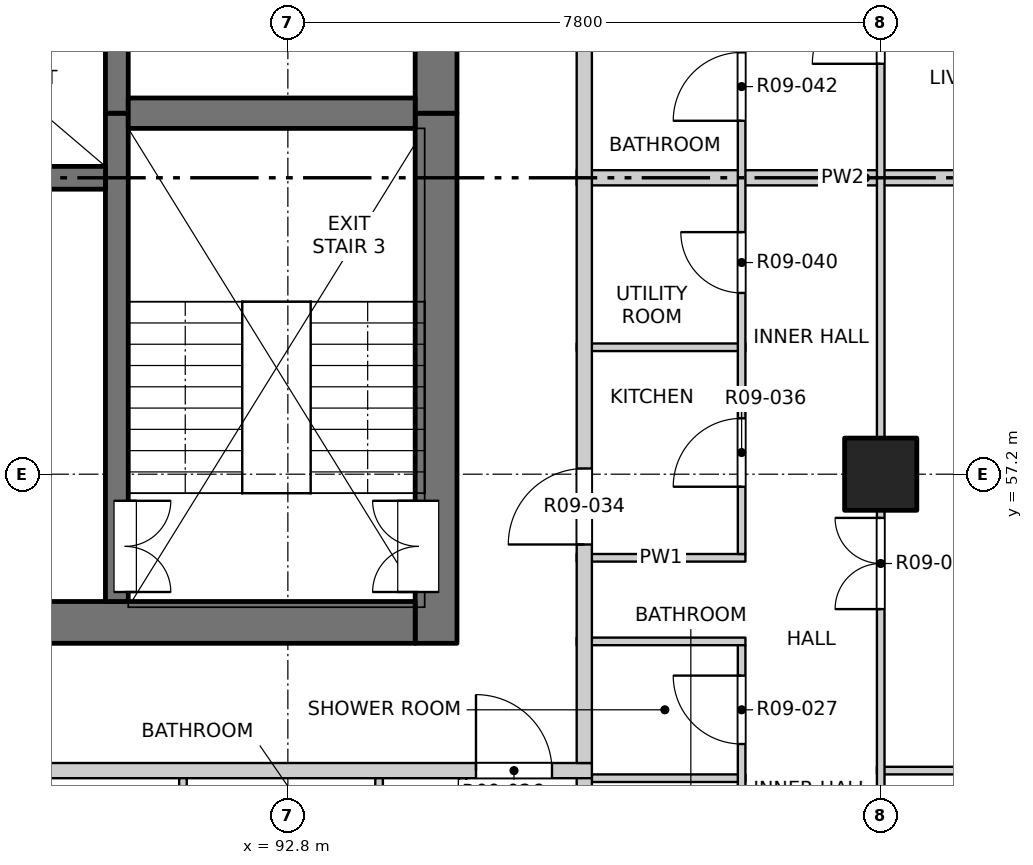
"""IFC4 building model, lengths in metres.
Left out: names, types, materials, properties, quantities, classifications, styles, units other than length and angle.
Written with IfcOpenShell. Run it as: python <this file> out.ifc"""

import sys

from ifc_helpers import new_model, si_unit, direction, frame, frame_2d, origin, origin_2d, place, context, subcontext, project, spatial, rectangle, extrude, element, fill, save


model = new_model("IFC4")
c1 = context("Model", 3, precision=1e-05, world=origin(), true_north=direction((0.0, 1.0)))
c2 = subcontext(c1, "Body", "Model", "MODEL_VIEW")
j1 = project(units=[si_unit("LENGTHUNIT", "METRE"), si_unit("PLANEANGLEUNIT", "RADIAN")], contexts=[c1])
p1 = place(None, origin())
s1 = spatial("IfcSite", under=j1, at=p1, CompositionType="ELEMENT")
p2 = place(p1, origin())
s2 = spatial("IfcBuilding", under=s1, at=p2, CompositionType="ELEMENT")
p3 = place(p2, frame((0.0, 0.0, 113.5)))
s3 = spatial("IfcBuildingStorey", under=s2, at=p3, CompositionType="ELEMENT", Elevation=113.5)
p4 = place(p3, frame((100.6, 57.2, -0.25), z_axis=(0.0, 0.0, 1.0), x_axis=(1.0, 0.0, 0.0)))
e1 = element("IfcColumn", 1, at=p4, inside=s3, PredefinedType="COLUMN", context=c2, shape_type="SweptSolid", body=[
    extrude(rectangle(XDim=0.95, YDim=0.95, at=origin_2d()), origin(), (0.0, 0.0, 1.0), 3.35),
])
p5 = place(p3, frame((94.75, 54.975, -0.25), z_axis=(0.0, 0.0, 1.0), x_axis=(0.0, 1.0, 0.0)))
e2 = element("IfcWall", 2, at=p5, inside=s3, PredefinedType="SOLIDWALL", context=c2, shape_type="SweptSolid", body=[
    extrude(rectangle(XDim=6.975, YDim=0.55, at=frame_2d((3.487, 0.0))), origin(), (0.0, 0.0, 1.0), 3.35),
])
p6 = place(p5, frame((0.675, 0.0, 0.25)))
e3 = element("IfcOpeningElement", 3, at=p6, cuts=e2, PredefinedType="OPENING", context=c2, shape_type="SweptSolid", body=[
    extrude(rectangle(XDim=1.2, YDim=2.1, at=frame_2d((0.6, 1.05))), frame((0.0, 0.285, 0.0), z_axis=(0.0, -1.0, 0.0), x_axis=(1.0, 0.0, 0.0)), (0.0, 0.0, 1.0), 0.57),
])
p7 = place(p3, frame((94.75, 61.95, -0.25), z_axis=(0.0, 0.0, 1.0), x_axis=(0.0, 1.0, 0.0)))
e4 = element("IfcWall", 4, at=p7, inside=s3, PredefinedType="SOLIDWALL", context=c2, shape_type="SweptSolid", body=[
    extrude(rectangle(XDim=15.35, YDim=0.55, at=frame_2d((7.675, 0.0))), origin(), (0.0, 0.0, 1.0), 3.35),
])
p8 = place(p7, frame((0.925, 0.0, 0.25)))
e5 = element("IfcOpeningElement", 5, at=p8, cuts=e4, PredefinedType="OPENING", context=c2, shape_type="SweptSolid", body=[
    extrude(rectangle(XDim=0.9, YDim=2.1, at=frame_2d((0.45, 1.05))), frame((0.0, 0.285, 0.0), z_axis=(0.0, -1.0, 0.0), x_axis=(1.0, 0.0, 0.0)), (0.0, 0.0, 1.0), 0.57),
])
p9 = place(p7, frame((3.8, 0.0, 0.25)))
e6 = element("IfcOpeningElement", 6, at=p9, cuts=e4, PredefinedType="OPENING", context=c2, shape_type="SweptSolid", body=[
    extrude(rectangle(XDim=0.9, YDim=2.1, at=frame_2d((0.45, 1.05))), frame((0.0, 0.285, 0.0), z_axis=(0.0, -1.0, 0.0), x_axis=(1.0, 0.0, 0.0)), (0.0, 0.0, 1.0), 0.57),
])
p10 = place(p7, frame((8.3, 0.0, 0.25)))
e7 = element("IfcOpeningElement", 7, at=p10, cuts=e4, PredefinedType="OPENING", context=c2, shape_type="SweptSolid", body=[
    extrude(rectangle(XDim=0.9, YDim=2.1, at=frame_2d((0.45, 1.05))), frame((0.0, 0.285, 0.0), z_axis=(0.0, -1.0, 0.0), x_axis=(1.0, 0.0, 0.0)), (0.0, 0.0, 1.0), 0.57),
])
p11 = place(p7, frame((13.1, 0.0, 0.25)))
e8 = element("IfcOpeningElement", 8, at=p11, cuts=e4, PredefinedType="OPENING", context=c2, shape_type="SweptSolid", body=[
    extrude(rectangle(XDim=0.9, YDim=2.1, at=frame_2d((0.45, 1.05))), frame((0.0, 0.285, 0.0), z_axis=(0.0, -1.0, 0.0), x_axis=(1.0, 0.0, 0.0)), (0.0, 0.0, 1.0), 0.57),
])
p12 = place(p3, frame((75.525, 55.25, -0.25), z_axis=(0.0, 0.0, 1.0), x_axis=(1.0, 0.0, 0.0)))
e9 = element("IfcWall", 9, at=p12, inside=s3, PredefinedType="SOLIDWALL", context=c2, shape_type="SweptSolid", body=[
    extrude(rectangle(XDim=18.95, YDim=0.55, at=frame_2d((9.475, 0.0))), origin(), (0.0, 0.0, 1.0), 3.35),
])
p13 = place(p12, frame((8.725, 0.0, 0.25)))
e10 = element("IfcOpeningElement", 10, at=p13, cuts=e9, PredefinedType="OPENING", context=c2, shape_type="SweptSolid", body=[
    extrude(rectangle(XDim=1.5, YDim=2.1, at=frame_2d((0.75, 1.05))), frame((0.0, 0.285, 0.0), z_axis=(0.0, -1.0, 0.0), x_axis=(1.0, 0.0, 0.0)), (0.0, 0.0, 1.0), 0.57),
])
p14 = place(p3, frame((90.55, 55.525, -0.25), z_axis=(0.0, 0.0, 1.0), x_axis=(0.0, 1.0, 0.0)))
e11 = element("IfcWall", 11, at=p14, inside=s3, PredefinedType="SOLIDWALL", context=c2, shape_type="SweptSolid", body=[
    extrude(rectangle(XDim=6.425, YDim=0.3, at=frame_2d((3.212, 0.0))), origin(), (0.0, 0.0, 1.0), 3.35),
])
p15 = place(p14, frame((0.125, 0.0, 0.25)))
e12 = element("IfcOpeningElement", 12, at=p15, cuts=e11, PredefinedType="OPENING", context=c2, shape_type="SweptSolid", body=[
    extrude(rectangle(XDim=1.2, YDim=2.1, at=frame_2d((0.6, 1.05))), frame((0.0, 0.16, 0.0), z_axis=(0.0, -1.0, 0.0), x_axis=(1.0, 0.0, 0.0)), (0.0, 0.0, 1.0), 0.32),
])
p16 = place(p3, frame((90.55, 61.95, -0.25), z_axis=(0.0, 0.0, 1.0), x_axis=(0.0, 1.0, 0.0)))
e13 = element("IfcWall", 13, at=p16, inside=s3, PredefinedType="SOLIDWALL", context=c2, shape_type="SweptSolid", body=[
    extrude(rectangle(XDim=15.35, YDim=0.3, at=frame_2d((7.675, 0.0))), origin(), (0.0, 0.0, 1.0), 3.35),
])
p17 = place(p3, frame((87.4, 61.1, -0.25), z_axis=(0.0, 0.0, 1.0), x_axis=(1.0, 0.0, 0.0)))
e14 = element("IfcWall", 14, at=p17, inside=s3, PredefinedType="SOLIDWALL", context=c2, shape_type="SweptSolid", body=[
    extrude(rectangle(XDim=3.0, YDim=0.3, at=frame_2d((1.5, 0.0))), origin(), (0.0, 0.0, 1.0), 3.35),
])
p18 = place(p3, frame((90.7, 61.95, -0.25), z_axis=(0.0, 0.0, 1.0), x_axis=(1.0, 0.0, 0.0)))
e15 = element("IfcWall", 15, at=p18, inside=s3, PredefinedType="SOLIDWALL", context=c2, shape_type="SweptSolid", body=[
    extrude(rectangle(XDim=3.775, YDim=0.4, at=frame_2d((1.888, 0.0))), origin(), (0.0, 0.0, 1.0), 3.35),
])
p19 = place(p3, frame((96.8, 53.2, 0.0), z_axis=(0.0, 0.0, 1.0), x_axis=(1.0, 0.0, 0.0)))
e16 = element("IfcWall", 16, at=p19, inside=s3, PredefinedType="PARTITIONING", context=c2, shape_type="SweptSolid", body=[
    extrude(rectangle(XDim=2.02, YDim=0.1, at=frame_2d((1.01, 0.0))), origin(), (0.0, 0.0, 1.0), 3.1),
])
p20 = place(p3, frame((73.2, 53.3, 0.0), z_axis=(0.0, 0.0, 1.0), x_axis=(1.0, 0.0, 0.0)))
e17 = element("IfcWall", 17, at=p20, inside=s3, PredefinedType="PARTITIONING", context=c2, shape_type="SweptSolid", body=[
    extrude(rectangle(XDim=23.6, YDim=0.2, at=frame_2d((11.8, 0.0))), origin(), (0.0, 0.0, 1.0), 3.1),
])
p21 = place(p20, frame((10.375, 0.0, 0.0)))
e18 = element("IfcOpeningElement", 18, at=p21, cuts=e17, PredefinedType="OPENING", context=c2, shape_type="SweptSolid", body=[
    extrude(rectangle(XDim=1.0, YDim=2.1, at=frame_2d((0.5, 1.05))), frame((0.0, 0.11, 0.0), z_axis=(0.0, -1.0, 0.0), x_axis=(1.0, 0.0, 0.0)), (0.0, 0.0, 1.0), 0.22),
])
p22 = place(p20, frame((22.075, 0.0, 0.0)))
e19 = element("IfcOpeningElement", 19, at=p22, cuts=e17, PredefinedType="OPENING", context=c2, shape_type="SweptSolid", body=[
    extrude(rectangle(XDim=1.0, YDim=2.1, at=frame_2d((0.5, 1.05))), frame((0.0, 0.11, 0.0), z_axis=(0.0, -1.0, 0.0), x_axis=(1.0, 0.0, 0.0)), (0.0, 0.0, 1.0), 0.22),
])
p23 = place(p3, frame((100.55, 53.3, 0.0), z_axis=(0.0, 0.0, 1.0), x_axis=(1.0, 0.0, 0.0)))
e20 = element("IfcWall", 20, at=p23, inside=s3, PredefinedType="PARTITIONING", context=c2, shape_type="SweptSolid", body=[
    extrude(rectangle(XDim=3.65, YDim=0.1, at=frame_2d((1.825, 0.0))), origin(), (0.0, 0.0, 1.0), 3.1),
])
for number, where, z_axis, x_axis in (
    (21, (96.6, 55.0, 0.0), (0.0, 0.0, 1.0), (1.0, 0.0, 0.0)),
    (22, (96.6, 56.1, 0.0), (0.0, 0.0, 1.0), (1.0, 0.0, 0.0)),
    (23, (96.6, 58.87, 0.0), (0.0, 0.0, 1.0), (1.0, 0.0, 0.0)),
):
    element("IfcWall", number, at=place(p3, frame(where, z_axis=z_axis, x_axis=x_axis)), inside=s3, PredefinedType="PARTITIONING", context=c2, shape_type="SweptSolid", body=[
        extrude(rectangle(XDim=2.22, YDim=0.1, at=frame_2d((1.11, 0.0))), origin(), (0.0, 0.0, 1.0), 3.1),
    ])
p24 = place(p3, frame((96.6, 61.1, 0.0), z_axis=(0.0, 0.0, 1.0), x_axis=(1.0, 0.0, 0.0)))
e24 = element("IfcWall", 24, at=p24, inside=s3, PredefinedType="PARTITIONING", context=c2, shape_type="SweptSolid", body=[
    extrude(rectangle(XDim=7.6, YDim=0.2, at=frame_2d((3.8, 0.0))), origin(), (0.0, 0.0, 1.0), 3.1),
])
for number, where, z_axis, x_axis in (
    (25, (91.42, 51.28, 0.0), (0.0, 0.0, 1.0), (0.0, 1.0, 0.0)),
    (26, (94.0, 51.28, 0.0), (0.0, 0.0, 1.0), (0.0, 1.0, 0.0)),
    (27, (95.1, 51.28, 0.0), (0.0, 0.0, 1.0), (0.0, 1.0, 0.0)),
):
    element("IfcWall", number, at=place(p3, frame(where, z_axis=z_axis, x_axis=x_axis)), inside=s3, PredefinedType="PARTITIONING", context=c2, shape_type="SweptSolid", body=[
        extrude(rectangle(XDim=1.92, YDim=0.1, at=frame_2d((0.96, 0.0))), origin(), (0.0, 0.0, 1.0), 3.1),
    ])
p25 = place(p3, frame((96.7, 45.8, 0.0), z_axis=(0.0, 0.0, 1.0), x_axis=(0.0, 1.0, 0.0)))
e28 = element("IfcWall", 28, at=p25, inside=s3, PredefinedType="PARTITIONING", context=c2, shape_type="SweptSolid", body=[
    extrude(rectangle(XDim=7.4, YDim=0.2, at=frame_2d((3.7, 0.0))), origin(), (0.0, 0.0, 1.0), 3.1),
])
p26 = place(p3, frame((96.7, 53.4, 0.0), z_axis=(0.0, 0.0, 1.0), x_axis=(0.0, 1.0, 0.0)))
e29 = element("IfcWall", 29, at=p26, inside=s3, PredefinedType="PARTITIONING", context=c2, shape_type="SweptSolid", body=[
    extrude(rectangle(XDim=30.8, YDim=0.2, at=frame_2d((15.4, 0.0))), origin(), (0.0, 0.0, 1.0), 3.1),
])
p27 = place(p26, frame((2.875, 0.0, 0.0)))
e30 = element("IfcOpeningElement", 30, at=p27, cuts=e29, PredefinedType="OPENING", context=c2, shape_type="SweptSolid", body=[
    extrude(rectangle(XDim=1.0, YDim=2.1, at=frame_2d((0.5, 1.05))), frame((0.0, 0.11, 0.0), z_axis=(0.0, -1.0, 0.0), x_axis=(1.0, 0.0, 0.0)), (0.0, 0.0, 1.0), 0.22),
])
p28 = place(p26, frame((14.775, 0.0, 0.0)))
e31 = element("IfcOpeningElement", 31, at=p28, cuts=e29, PredefinedType="OPENING", context=c2, shape_type="SweptSolid", body=[
    extrude(rectangle(XDim=1.0, YDim=2.1, at=frame_2d((0.5, 1.05))), frame((0.0, 0.11, 0.0), z_axis=(0.0, -1.0, 0.0), x_axis=(1.0, 0.0, 0.0)), (0.0, 0.0, 1.0), 0.22),
])
p29 = place(p26, frame((20.025, 0.0, 0.0)))
e32 = element("IfcOpeningElement", 32, at=p29, cuts=e29, PredefinedType="OPENING", context=c2, shape_type="SweptSolid", body=[
    extrude(rectangle(XDim=1.0, YDim=2.1, at=frame_2d((0.5, 1.05))), frame((0.0, 0.11, 0.0), z_axis=(0.0, -1.0, 0.0), x_axis=(1.0, 0.0, 0.0)), (0.0, 0.0, 1.0), 0.22),
])
p30 = place(p3, frame((98.77, 49.45, 0.0), z_axis=(0.0, 0.0, 1.0), x_axis=(0.0, 1.0, 0.0)))
e33 = element("IfcWall", 33, at=p30, inside=s3, PredefinedType="PARTITIONING", context=c2, shape_type="SweptSolid", body=[
    extrude(rectangle(XDim=5.5, YDim=0.1, at=frame_2d((2.75, 0.0))), origin(), (0.0, 0.0, 1.0), 3.1),
])
p31 = place(p30, frame((0.475, 0.0, 0.0)))
e34 = element("IfcOpeningElement", 34, at=p31, cuts=e33, PredefinedType="OPENING", context=c2, shape_type="SweptSolid", body=[
    extrude(rectangle(XDim=0.8, YDim=2.1, at=frame_2d((0.4, 1.05))), frame((0.0, 0.06, 0.0), z_axis=(0.0, -1.0, 0.0), x_axis=(1.0, 0.0, 0.0)), (0.0, 0.0, 1.0), 0.12),
])
p32 = place(p30, frame((2.325, 0.0, 0.0)))
e35 = element("IfcOpeningElement", 35, at=p32, cuts=e33, PredefinedType="OPENING", context=c2, shape_type="SweptSolid", body=[
    extrude(rectangle(XDim=0.9, YDim=2.1, at=frame_2d((0.45, 1.05))), frame((0.0, 0.06, 0.0), z_axis=(0.0, -1.0, 0.0), x_axis=(1.0, 0.0, 0.0)), (0.0, 0.0, 1.0), 0.12),
])
p33 = place(p30, frame((4.2, 0.0, 0.0)))
e36 = element("IfcOpeningElement", 36, at=p33, cuts=e33, PredefinedType="OPENING", context=c2, shape_type="SweptSolid", body=[
    extrude(rectangle(XDim=0.9, YDim=2.1, at=frame_2d((0.45, 1.05))), frame((0.0, 0.06, 0.0), z_axis=(0.0, -1.0, 0.0), x_axis=(1.0, 0.0, 0.0)), (0.0, 0.0, 1.0), 0.12),
])
p34 = place(p3, frame((98.77, 56.15, 0.0), z_axis=(0.0, 0.0, 1.0), x_axis=(0.0, 1.0, 0.0)))
e37 = element("IfcWall", 37, at=p34, inside=s3, PredefinedType="PARTITIONING", context=c2, shape_type="SweptSolid", body=[
    extrude(rectangle(XDim=10.7, YDim=0.1, at=frame_2d((5.35, 0.0))), origin(), (0.0, 0.0, 1.0), 3.1),
])
p35 = place(p34, frame((0.885, 0.0, 0.0)))
e38 = element("IfcOpeningElement", 38, at=p35, cuts=e37, PredefinedType="OPENING", context=c2, shape_type="SweptSolid", body=[
    extrude(rectangle(XDim=0.9, YDim=2.1, at=frame_2d((0.45, 1.05))), frame((0.0, 0.06, 0.0), z_axis=(0.0, -1.0, 0.0), x_axis=(1.0, 0.0, 0.0)), (0.0, 0.0, 1.0), 0.12),
])
p36 = place(p34, frame((3.435, 0.0, 0.0)))
e39 = element("IfcOpeningElement", 39, at=p36, cuts=e37, PredefinedType="OPENING", context=c2, shape_type="SweptSolid", body=[
    extrude(rectangle(XDim=0.8, YDim=2.1, at=frame_2d((0.4, 1.05))), frame((0.0, 0.06, 0.0), z_axis=(0.0, -1.0, 0.0), x_axis=(1.0, 0.0, 0.0)), (0.0, 0.0, 1.0), 0.12),
])
p37 = place(p34, frame((5.7, 0.0, 0.0)))
e40 = element("IfcOpeningElement", 40, at=p37, cuts=e37, PredefinedType="OPENING", context=c2, shape_type="SweptSolid", body=[
    extrude(rectangle(XDim=0.9, YDim=2.1, at=frame_2d((0.45, 1.05))), frame((0.0, 0.06, 0.0), z_axis=(0.0, -1.0, 0.0), x_axis=(1.0, 0.0, 0.0)), (0.0, 0.0, 1.0), 0.12),
])
p38 = place(p34, frame((8.6, 0.0, 0.0)))
e41 = element("IfcOpeningElement", 41, at=p38, cuts=e37, PredefinedType="OPENING", context=c2, shape_type="SweptSolid", body=[
    extrude(rectangle(XDim=0.9, YDim=2.1, at=frame_2d((0.45, 1.05))), frame((0.0, 0.06, 0.0), z_axis=(0.0, -1.0, 0.0), x_axis=(1.0, 0.0, 0.0)), (0.0, 0.0, 1.0), 0.12),
])
p39 = place(p3, frame((100.6, 45.8, 0.0), z_axis=(0.0, 0.0, 1.0), x_axis=(0.0, 1.0, 0.0)))
e42 = element("IfcWall", 42, at=p39, inside=s3, PredefinedType="PARTITIONING", context=c2, shape_type="SweptSolid", body=[
    extrude(rectangle(XDim=38.4, YDim=0.1, at=frame_2d((19.2, 0.0))), origin(), (0.0, 0.0, 1.0), 3.1),
])
p40 = place(p39, frame((1.05, 0.0, 0.0)))
e43 = element("IfcOpeningElement", 43, at=p40, cuts=e42, PredefinedType="OPENING", context=c2, shape_type="SweptSolid", body=[
    extrude(rectangle(XDim=1.2, YDim=2.1, at=frame_2d((0.6, 1.05))), frame((0.0, 0.06, 0.0), z_axis=(0.0, -1.0, 0.0), x_axis=(1.0, 0.0, 0.0)), (0.0, 0.0, 1.0), 0.12),
])
p41 = place(p39, frame((5.1, 0.0, 0.0)))
e44 = element("IfcOpeningElement", 44, at=p41, cuts=e42, PredefinedType="OPENING", context=c2, shape_type="SweptSolid", body=[
    extrude(rectangle(XDim=0.9, YDim=2.1, at=frame_2d((0.45, 1.05))), frame((0.0, 0.06, 0.0), z_axis=(0.0, -1.0, 0.0), x_axis=(1.0, 0.0, 0.0)), (0.0, 0.0, 1.0), 0.12),
])
p42 = place(p39, frame((9.625, 0.0, 0.0)))
e45 = element("IfcOpeningElement", 45, at=p42, cuts=e42, PredefinedType="OPENING", context=c2, shape_type="SweptSolid", body=[
    extrude(rectangle(XDim=1.2, YDim=2.1, at=frame_2d((0.6, 1.05))), frame((0.0, 0.06, 0.0), z_axis=(0.0, -1.0, 0.0), x_axis=(1.0, 0.0, 0.0)), (0.0, 0.0, 1.0), 0.12),
])
p43 = place(p39, frame((16.8, 0.0, 0.0)))
e46 = element("IfcOpeningElement", 46, at=p43, cuts=e42, PredefinedType="OPENING", context=c2, shape_type="SweptSolid", body=[
    extrude(rectangle(XDim=0.9, YDim=2.1, at=frame_2d((0.45, 1.05))), frame((0.0, 0.06, 0.0), z_axis=(0.0, -1.0, 0.0), x_axis=(1.0, 0.0, 0.0)), (0.0, 0.0, 1.0), 0.12),
])
p44 = place(p39, frame((20.7, 0.0, 0.0)))
e47 = element("IfcOpeningElement", 47, at=p44, cuts=e42, PredefinedType="OPENING", context=c2, shape_type="SweptSolid", body=[
    extrude(rectangle(XDim=0.9, YDim=2.1, at=frame_2d((0.45, 1.05))), frame((0.0, 0.06, 0.0), z_axis=(0.0, -1.0, 0.0), x_axis=(1.0, 0.0, 0.0)), (0.0, 0.0, 1.0), 0.12),
])
p45 = place(p39, frame((24.6, 0.0, 0.0)))
e48 = element("IfcOpeningElement", 48, at=p45, cuts=e42, PredefinedType="OPENING", context=c2, shape_type="SweptSolid", body=[
    extrude(rectangle(XDim=0.9, YDim=2.1, at=frame_2d((0.45, 1.05))), frame((0.0, 0.06, 0.0), z_axis=(0.0, -1.0, 0.0), x_axis=(1.0, 0.0, 0.0)), (0.0, 0.0, 1.0), 0.12),
])
p46 = place(p39, frame((28.5, 0.0, 0.0)))
e49 = element("IfcOpeningElement", 49, at=p46, cuts=e42, PredefinedType="OPENING", context=c2, shape_type="SweptSolid", body=[
    extrude(rectangle(XDim=0.9, YDim=2.1, at=frame_2d((0.45, 1.05))), frame((0.0, 0.06, 0.0), z_axis=(0.0, -1.0, 0.0), x_axis=(1.0, 0.0, 0.0)), (0.0, 0.0, 1.0), 0.12),
])
p47 = place(p39, frame((32.4, 0.0, 0.0)))
e50 = element("IfcOpeningElement", 50, at=p47, cuts=e42, PredefinedType="OPENING", context=c2, shape_type="SweptSolid", body=[
    extrude(rectangle(XDim=0.9, YDim=2.1, at=frame_2d((0.45, 1.05))), frame((0.0, 0.06, 0.0), z_axis=(0.0, -1.0, 0.0), x_axis=(1.0, 0.0, 0.0)), (0.0, 0.0, 1.0), 0.12),
])
p48 = place(p39, frame((36.15, 0.0, 0.0)))
e51 = element("IfcOpeningElement", 51, at=p48, cuts=e42, PredefinedType="OPENING", context=c2, shape_type="SweptSolid", body=[
    extrude(rectangle(XDim=1.2, YDim=2.1, at=frame_2d((0.6, 1.05))), frame((0.0, 0.06, 0.0), z_axis=(0.0, -1.0, 0.0), x_axis=(1.0, 0.0, 0.0)), (0.0, 0.0, 1.0), 0.12),
])
p49 = place(p22, origin())
e52 = element("IfcDoor", 52, at=p49, inside=s3, OperationType="SINGLE_SWING_LEFT", PredefinedType="DOOR", context=c2, shape_type="SweptSolid", body=[
    extrude(rectangle(XDim=1.0, YDim=2.1, at=frame_2d((0.5, 1.05))), frame((0.0, 0.025, 0.0), z_axis=(0.0, -1.0, 0.0), x_axis=(1.0, 0.0, 0.0)), (0.0, 0.0, 1.0), 0.05),
])
fill(e19, e52)
p50 = place(p33, origin())
e53 = element("IfcDoor", 53, at=p50, inside=s3, OperationType="SINGLE_SWING_RIGHT", PredefinedType="DOOR", context=c2, shape_type="SweptSolid", body=[
    extrude(rectangle(XDim=0.9, YDim=2.1, at=frame_2d((0.45, 1.05))), frame((0.0, 0.025, 0.0), z_axis=(0.0, -1.0, 0.0), x_axis=(1.0, 0.0, 0.0)), (0.0, 0.0, 1.0), 0.05),
])
fill(e36, e53)
p51 = place(p42, origin())
e54 = element("IfcDoor", 54, at=p51, inside=s3, OperationType="DOUBLE_DOOR_SINGLE_SWING", PredefinedType="DOOR", context=c2, shape_type="SweptSolid", body=[
    extrude(rectangle(XDim=1.2, YDim=2.1, at=frame_2d((0.6, 1.05))), frame((0.0, 0.025, 0.0), z_axis=(0.0, -1.0, 0.0), x_axis=(1.0, 0.0, 0.0)), (0.0, 0.0, 1.0), 0.05),
])
fill(e45, e54)
p52 = place(p15, origin())
e55 = element("IfcDoor", 55, at=p52, inside=s3, OperationType="DOUBLE_DOOR_SINGLE_SWING", PredefinedType="DOOR", context=c2, shape_type="SweptSolid", body=[
    extrude(rectangle(XDim=1.2, YDim=2.1, at=frame_2d((0.6, 1.05))), frame((0.0, -0.085, 0.0), z_axis=(0.0, -1.0, 0.0), x_axis=(1.0, 0.0, 0.0)), (0.0, 0.0, 1.0), 0.05),
])
fill(e12, e55)
p53 = place(p6, origin())
e56 = element("IfcDoor", 56, at=p53, inside=s3, OperationType="DOUBLE_DOOR_SINGLE_SWING", PredefinedType="DOOR", context=c2, shape_type="SweptSolid", body=[
    extrude(rectangle(XDim=1.2, YDim=2.1, at=frame_2d((0.6, 1.05))), frame((0.0, 0.26, 0.0), z_axis=(0.0, -1.0, 0.0), x_axis=(1.0, 0.0, 0.0)), (0.0, 0.0, 1.0), 0.05),
])
fill(e3, e56)
p54 = place(p27, origin())
e57 = element("IfcDoor", 57, at=p54, inside=s3, OperationType="SINGLE_SWING_LEFT", PredefinedType="DOOR", context=c2, shape_type="SweptSolid", body=[
    extrude(rectangle(XDim=1.0, YDim=2.1, at=frame_2d((0.5, 1.05))), frame((0.0, 0.025, 0.0), z_axis=(0.0, -1.0, 0.0), x_axis=(1.0, 0.0, 0.0)), (0.0, 0.0, 1.0), 0.05),
])
fill(e30, e57)
p55 = place(p35, origin())
e58 = element("IfcDoor", 58, at=p55, inside=s3, OperationType="SINGLE_SWING_LEFT", PredefinedType="DOOR", context=c2, shape_type="SweptSolid", body=[
    extrude(rectangle(XDim=0.9, YDim=2.1, at=frame_2d((0.45, 1.05))), frame((0.0, 0.025, 0.0), z_axis=(0.0, -1.0, 0.0), x_axis=(1.0, 0.0, 0.0)), (0.0, 0.0, 1.0), 0.05),
])
fill(e38, e58)
p56 = place(p36, origin())
e59 = element("IfcDoor", 59, at=p56, inside=s3, OperationType="SINGLE_SWING_RIGHT", PredefinedType="DOOR", context=c2, shape_type="SweptSolid", body=[
    extrude(rectangle(XDim=0.8, YDim=2.1, at=frame_2d((0.4, 1.05))), frame((0.0, 0.025, 0.0), z_axis=(0.0, -1.0, 0.0), x_axis=(1.0, 0.0, 0.0)), (0.0, 0.0, 1.0), 0.05),
])
fill(e39, e59)
p57 = place(p37, origin())
e60 = element("IfcDoor", 60, at=p57, inside=s3, OperationType="SINGLE_SWING_LEFT", PredefinedType="DOOR", context=c2, shape_type="SweptSolid", body=[
    extrude(rectangle(XDim=0.9, YDim=2.1, at=frame_2d((0.45, 1.05))), frame((0.0, 0.025, 0.0), z_axis=(0.0, -1.0, 0.0), x_axis=(1.0, 0.0, 0.0)), (0.0, 0.0, 1.0), 0.05),
])
fill(e40, e60)
p58 = place(p43, origin())
e61 = element("IfcDoor", 61, at=p58, inside=s3, OperationType="SINGLE_SWING_LEFT", PredefinedType="DOOR", context=c2, shape_type="SweptSolid", body=[
    extrude(rectangle(XDim=0.9, YDim=2.1, at=frame_2d((0.45, 1.05))), frame((0.0, 0.025, 0.0), z_axis=(0.0, -1.0, 0.0), x_axis=(1.0, 0.0, 0.0)), (0.0, 0.0, 1.0), 0.05),
])
fill(e46, e61)
save(model, sys.argv[1])
